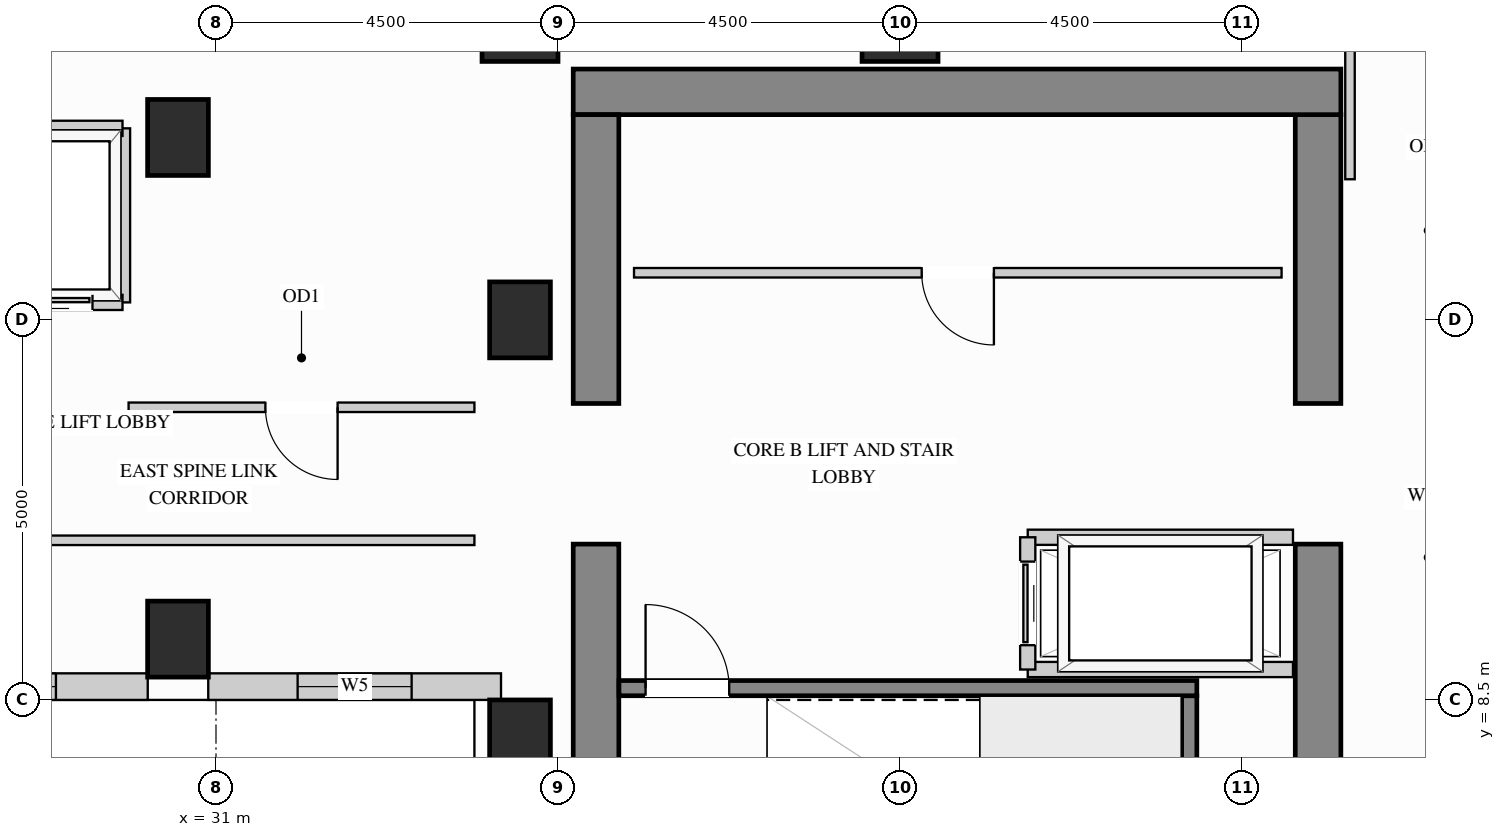
"""IFC4 building model, lengths in metres.
Left out: names, types, materials, properties, quantities, classifications, styles, units other than length and angle.
Written with IfcOpenShell. Run it as: python <this file> out.ifc"""

import sys

from ifc_helpers import new_model, si_unit, direction, frame, frame_2d, origin, origin_2d, place, context, subcontext, project, spatial, rectangle, extrude, source, transform, mapped, element, fill, save


model = new_model("IFC4")
c1 = context("Model", 3, precision=1e-05, world=origin(), true_north=direction((0.0, 1.0)))
c2 = subcontext(c1, "Body", "Model", "MODEL_VIEW")
j1 = project(units=[si_unit("LENGTHUNIT", "METRE"), si_unit("PLANEANGLEUNIT", "RADIAN")], contexts=[c1])
p1 = place(None, origin())
s1 = spatial("IfcSite", under=j1, at=p1, CompositionType="ELEMENT")
p2 = place(p1, origin())
s2 = spatial("IfcBuilding", under=s1, at=p2, CompositionType="ELEMENT")
p3 = place(p2, frame((0.0, 0.0, 179.1)))
s3 = spatial("IfcBuildingStorey", under=s2, at=p3, CompositionType="ELEMENT", Elevation=179.1)
m1 = source(origin(), c2, "Body", "SweptSolid", [
    extrude(rectangle(XDim=0.8, YDim=1.0, at=origin_2d()), origin(), (0.0, 0.0, 1.0), 3.4),
])
for number, where, z_axis, x_axis in (
    (1, (35.0, 13.5, 0.0), (0.0, 0.0, 1.0), (1.0, 0.0, 0.0)),
    (2, (35.0, 8.0, 0.0), (0.0, 0.0, 1.0), (1.0, 0.0, 0.0)),
    (3, (30.5, 15.9, 0.0), (0.0, 0.0, 1.0), (1.0, 0.0, 0.0)),
    (4, (30.5, 9.3, 0.0), (0.0, 0.0, 1.0), (1.0, 0.0, 0.0)),
):
    element("IfcColumn", number, at=place(p3, frame(where, z_axis=z_axis, x_axis=x_axis)), inside=s3, PredefinedType="COLUMN", context=c2, shape_type="MappedRepresentation", body=[
        mapped(m1, transform((0.0, 0.0, 0.0), x_axis=(1.0, 0.0, 0.0), y_axis=(0.0, 1.0, 0.0), z_axis=(0.0, 0.0, 1.0))),
    ])
m2 = source(origin(), c2, "Body", "SweptSolid", [
    extrude(rectangle(XDim=1.0, YDim=1.0, at=origin_2d()), origin(), (0.0, 0.0, 1.0), 3.4),
])
for number, where, z_axis, x_axis in (
    (5, (35.0, 17.4, 0.0), (0.0, 0.0, 1.0), (1.0, 0.0, 0.0)),
    (6, (40.0, 17.4, 0.0), (0.0, 0.0, 1.0), (1.0, 0.0, 0.0)),
):
    element("IfcColumn", number, at=place(p3, frame(where, z_axis=z_axis, x_axis=x_axis)), inside=s3, PredefinedType="COLUMN", context=c2, shape_type="MappedRepresentation", body=[
        mapped(m2, transform((0.0, 0.0, 0.0), x_axis=(1.0, 0.0, 0.0), y_axis=(0.0, 1.0, 0.0), z_axis=(0.0, 0.0, 1.0))),
    ])
m3 = source(origin(), c2, "Body", "SweptSolid", [
    extrude(rectangle(XDim=5.75, YDim=0.6, at=frame_2d((2.875, 0.0))), origin(), (0.0, 0.0, 1.0), 3.4),
])
p4 = place(p3, frame((45.5, 4.8, 0.0), z_axis=(0.0, 0.0, 1.0), x_axis=(0.0, 1.0, 0.0)))
e7 = element("IfcWall", 7, at=p4, inside=s3, PredefinedType="SHEAR", context=c2, shape_type="MappedRepresentation", body=[
    mapped(m3, transform((0.0, 0.0, 0.0), x_axis=(1.0, 0.0, 0.0), y_axis=(0.0, 1.0, 0.0), z_axis=(0.0, 0.0, 1.0))),
])
m4 = source(origin(), c2, "Body", "SweptSolid", [
    extrude(rectangle(XDim=3.8, YDim=0.6, at=frame_2d((1.9, 0.0))), origin(), (0.0, 0.0, 1.0), 3.4),
])
p5 = place(p3, frame((45.5, 12.4, 0.0), z_axis=(0.0, 0.0, 1.0), x_axis=(0.0, 1.0, 0.0)))
e8 = element("IfcWall", 8, at=p5, inside=s3, PredefinedType="SHEAR", context=c2, shape_type="MappedRepresentation", body=[
    mapped(m4, transform((0.0, 0.0, 0.0), x_axis=(1.0, 0.0, 0.0), y_axis=(0.0, 1.0, 0.0), z_axis=(0.0, 0.0, 1.0))),
])
m5 = source(origin(), c2, "Body", "SweptSolid", [
    extrude(rectangle(XDim=10.1, YDim=0.6, at=frame_2d((5.05, 0.0))), origin(), (0.0, 0.0, 1.0), 3.4),
])
p6 = place(p3, frame((35.7, 16.5, 0.0), z_axis=(0.0, 0.0, 1.0), x_axis=(1.0, 0.0, 0.0)))
e9 = element("IfcWall", 9, at=p6, inside=s3, PredefinedType="SHEAR", context=c2, shape_type="MappedRepresentation", body=[
    mapped(m5, transform((0.0, 0.0, 0.0), x_axis=(1.0, 0.0, 0.0), y_axis=(0.0, 1.0, 0.0), z_axis=(0.0, 0.0, 1.0))),
])
p7 = place(p3, frame((36.0, 4.8, 0.0), z_axis=(0.0, 0.0, 1.0), x_axis=(0.0, 1.0, 0.0)))
e10 = element("IfcWall", 10, at=p7, inside=s3, PredefinedType="SHEAR", context=c2, shape_type="MappedRepresentation", body=[
    mapped(m3, transform((0.0, 0.0, 0.0), x_axis=(1.0, 0.0, 0.0), y_axis=(0.0, 1.0, 0.0), z_axis=(0.0, 0.0, 1.0))),
])
p8 = place(p3, frame((36.0, 12.4, 0.0), z_axis=(0.0, 0.0, 1.0), x_axis=(0.0, 1.0, 0.0)))
e11 = element("IfcWall", 11, at=p8, inside=s3, PredefinedType="SHEAR", context=c2, shape_type="MappedRepresentation", body=[
    mapped(m4, transform((0.0, 0.0, 0.0), x_axis=(1.0, 0.0, 0.0), y_axis=(0.0, 1.0, 0.0), z_axis=(0.0, 0.0, 1.0))),
])
p9 = place(p3, frame((23.798, 8.675, 0.0), z_axis=(0.0, 0.0, 1.0), x_axis=(1.0, 0.0, 0.0)))
e12 = element("IfcWall", 12, at=p9, inside=s3, PredefinedType="SOLIDWALL", context=c2, shape_type="SweptSolid", body=[
    extrude(rectangle(XDim=6.304, YDim=0.35, at=frame_2d((3.152, 0.0))), origin(), (0.0, 0.0, 1.0), 3.385),
])
p10 = place(p9, frame((1.208, 0.0, 0.78)))
e13 = element("IfcOpeningElement", 13, at=p10, cuts=e12, PredefinedType="OPENING", context=c2, shape_type="SweptSolid", body=[
    extrude(rectangle(XDim=1.5, YDim=2.0, at=frame_2d((0.75, 1.0))), frame((0.0, 0.185, 0.0), z_axis=(0.0, -1.0, 0.0), x_axis=(1.0, 0.0, 0.0)), (0.0, 0.0, 1.0), 0.37),
])
p11 = place(p9, frame((3.596, 0.0, 0.78)))
e14 = element("IfcOpeningElement", 14, at=p11, cuts=e12, PredefinedType="OPENING", context=c2, shape_type="SweptSolid", body=[
    extrude(rectangle(XDim=1.5, YDim=2.0, at=frame_2d((0.75, 1.0))), frame((0.0, 0.185, 0.0), z_axis=(0.0, -1.0, 0.0), x_axis=(1.0, 0.0, 0.0)), (0.0, 0.0, 1.0), 0.37),
])
p12 = place(p3, frame((30.898, 8.675, 0.0), z_axis=(0.0, 0.0, 1.0), x_axis=(1.0, 0.0, 0.0)))
e15 = element("IfcWall", 15, at=p12, inside=s3, PredefinedType="SOLIDWALL", context=c2, shape_type="SweptSolid", body=[
    extrude(rectangle(XDim=3.852, YDim=0.35, at=frame_2d((1.926, 0.0))), origin(), (0.0, 0.0, 1.0), 3.385),
])
p13 = place(p12, frame((1.176, 0.0, 0.78)))
e16 = element("IfcOpeningElement", 16, at=p13, cuts=e15, PredefinedType="OPENING", context=c2, shape_type="SweptSolid", body=[
    extrude(rectangle(XDim=1.5, YDim=2.0, at=frame_2d((0.75, 1.0))), frame((0.0, 0.185, 0.0), z_axis=(0.0, -1.0, 0.0), x_axis=(1.0, 0.0, 0.0)), (0.0, 0.0, 1.0), 0.37),
])
p14 = place(p3, frame((36.5, 14.12, 0.0), z_axis=(0.0, 0.0, 1.0), x_axis=(1.0, 0.0, 0.0)))
e17 = element("IfcWall", 17, at=p14, inside=s3, PredefinedType="PARTITIONING", context=c2, shape_type="SweptSolid", body=[
    extrude(rectangle(XDim=8.52, YDim=0.125, at=frame_2d((4.26, 0.0))), origin(), (0.0, 0.0, 1.0), 3.385),
])
p15 = place(p14, frame((3.785, 0.0, 0.0)))
e18 = element("IfcOpeningElement", 18, at=p15, cuts=e17, PredefinedType="OPENING", context=c2, shape_type="SweptSolid", body=[
    extrude(rectangle(XDim=0.95, YDim=2.15, at=frame_2d((0.475, 1.075))), frame((0.0, 0.073, 0.0), z_axis=(0.0, -1.0, 0.0), x_axis=(1.0, 0.0, 0.0)), (0.0, 0.0, 1.0), 0.145),
])
m6 = source(origin(), c2, "Body", "SweptSolid", [
    extrude(rectangle(XDim=2.298, YDim=0.125, at=frame_2d((1.149, 0.0))), origin(), (0.0, 0.0, 1.0), 3.385),
])
p16 = place(p3, frame((45.92, 15.35, 0.0), z_axis=(0.0, 0.0, 1.0), x_axis=(0.0, 1.0, 0.0)))
e19 = element("IfcWall", 19, at=p16, inside=s3, PredefinedType="PARTITIONING", context=c2, shape_type="MappedRepresentation", body=[
    mapped(m6, transform((0.0, 0.0, 0.0), x_axis=(1.0, 0.0, 0.0), y_axis=(0.0, 1.0, 0.0), z_axis=(0.0, 0.0, 1.0))),
])
p17 = place(p3, frame((29.85, 12.35, 0.0), z_axis=(0.0, 0.0, 1.0), x_axis=(1.0, 0.0, 0.0)))
e20 = element("IfcWall", 20, at=p17, inside=s3, PredefinedType="PARTITIONING", context=c2, shape_type="SweptSolid", body=[
    extrude(rectangle(XDim=4.55, YDim=0.125, at=frame_2d((2.275, 0.0))), origin(), (0.0, 0.0, 1.0), 3.385),
])
p18 = place(p17, frame((1.8, 0.0, 0.0)))
e21 = element("IfcOpeningElement", 21, at=p18, cuts=e20, PredefinedType="OPENING", context=c2, shape_type="SweptSolid", body=[
    extrude(rectangle(XDim=0.95, YDim=2.15, at=frame_2d((0.475, 1.075))), frame((0.0, 0.073, 0.0), z_axis=(0.0, -1.0, 0.0), x_axis=(1.0, 0.0, 0.0)), (0.0, 0.0, 1.0), 0.145),
])
p19 = place(p3, frame((19.5, 10.6, 0.0), z_axis=(0.0, 0.0, 1.0), x_axis=(1.0, 0.0, 0.0)))
e22 = element("IfcWall", 22, at=p19, inside=s3, PredefinedType="PARTITIONING", context=c2, shape_type="SweptSolid", body=[
    extrude(rectangle(XDim=14.9, YDim=0.125, at=frame_2d((7.45, 0.0))), origin(), (0.0, 0.0, 1.0), 3.385),
])
p20 = place(p19, frame((6.975, 0.0, 0.0)))
e23 = element("IfcOpeningElement", 23, at=p20, cuts=e22, PredefinedType="OPENING", context=c2, shape_type="SweptSolid", body=[
    extrude(rectangle(XDim=0.95, YDim=2.15, at=frame_2d((0.475, 1.075))), frame((0.0, 0.073, 0.0), z_axis=(0.0, -1.0, 0.0), x_axis=(1.0, 0.0, 0.0)), (0.0, 0.0, 1.0), 0.145),
])
m7 = source(origin(), c2, "Body", "SweptSolid", [
    extrude(rectangle(XDim=2.29, YDim=0.2, at=frame_2d((1.145, 0.0))), origin(), (0.0, 0.0, 1.0), 3.385),
])
p21 = place(p3, frame((29.77, 13.73, 0.0), z_axis=(0.0, 0.0, 1.0), x_axis=(0.0, 1.0, 0.0)))
e24 = element("IfcWall", 24, at=p21, inside=s3, PredefinedType="PARTITIONING", context=c2, shape_type="MappedRepresentation", body=[
    mapped(m7, transform((0.0, 0.0, 0.0), x_axis=(1.0, 0.0, 0.0), y_axis=(0.0, 1.0, 0.0), z_axis=(0.0, 0.0, 1.0))),
])
m8 = source(origin(), c2, "Body", "SweptSolid", [
    extrude(rectangle(XDim=1.89, YDim=0.2, at=frame_2d((0.945, 0.0))), origin(), (0.0, 0.0, 1.0), 2.773),
])
p22 = place(p3, frame((27.88, 16.02, 0.0), z_axis=(0.0, 0.0, 1.0), x_axis=(1.0, 0.0, 0.0)))
e25 = element("IfcWall", 25, at=p22, inside=s3, PredefinedType="PARTITIONING", context=c2, shape_type="MappedRepresentation", body=[
    mapped(m8, transform((0.0, 0.0, 0.0), x_axis=(1.0, 0.0, 0.0), y_axis=(0.0, 1.0, 0.0), z_axis=(0.0, 0.0, 1.0))),
])
p23 = place(p3, frame((27.88, 13.73, 0.0), z_axis=(0.0, 0.0, 1.0), x_axis=(1.0, 0.0, 0.0)))
e26 = element("IfcWall", 26, at=p23, inside=s3, PredefinedType="PARTITIONING", context=c2, shape_type="SweptSolid", body=[
    extrude(rectangle(XDim=1.89, YDim=0.2, at=frame_2d((0.945, 0.0))), origin(), (0.0, 0.0, 1.0), 2.466),
])
p24 = place(p23, frame((0.395, 0.0, 0.0)))
e27 = element("IfcOpeningElement", 27, at=p24, cuts=e26, PredefinedType="OPENING", context=c2, shape_type="SweptSolid", body=[
    extrude(rectangle(XDim=1.1, YDim=2.2, at=frame_2d((0.55, 1.1))), frame((0.0, 0.11, 0.0), z_axis=(0.0, -1.0, 0.0), x_axis=(1.0, 0.0, 0.0)), (0.0, 0.0, 1.0), 0.22),
])
m9 = source(origin(), c2, "Body", "SweptSolid", [
    extrude(rectangle(XDim=3.49, YDim=0.2, at=frame_2d((1.745, 0.0))), origin(), (0.0, 0.0, 1.0), 3.385),
])
for number, where, z_axis, x_axis in (
    (28, (41.68, 10.64, 0.0), (0.0, 0.0, 1.0), (1.0, 0.0, 0.0)),
    (29, (41.68, 8.9, 0.0), (0.0, 0.0, 1.0), (1.0, 0.0, 0.0)),
):
    element("IfcWall", number, at=place(p3, frame(where, z_axis=z_axis, x_axis=x_axis)), inside=s3, PredefinedType="PARTITIONING", context=c2, shape_type="MappedRepresentation", body=[
        mapped(m9, transform((0.0, 0.0, 0.0), x_axis=(1.0, 0.0, 0.0), y_axis=(0.0, 1.0, 0.0), z_axis=(0.0, 0.0, 1.0))),
    ])
p25 = place(p3, frame((41.68, 8.9, 0.0), z_axis=(0.0, 0.0, 1.0), x_axis=(0.0, 1.0, 0.0)))
e30 = element("IfcWall", 30, at=p25, inside=s3, PredefinedType="PARTITIONING", context=c2, shape_type="SweptSolid", body=[
    extrude(rectangle(XDim=1.74, YDim=0.2, at=frame_2d((0.87, 0.0))), origin(), (0.0, 0.0, 1.0), 3.385),
])
p26 = place(p25, frame((0.32, 0.0, 0.0)))
e31 = element("IfcOpeningElement", 31, at=p26, cuts=e30, PredefinedType="OPENING", context=c2, shape_type="SweptSolid", body=[
    extrude(rectangle(XDim=1.1, YDim=2.2, at=frame_2d((0.55, 1.1))), frame((0.0, 0.11, 0.0), z_axis=(0.0, -1.0, 0.0), x_axis=(1.0, 0.0, 0.0)), (0.0, 0.0, 1.0), 0.22),
])
m10 = source(origin(), c2, "Body", "SweptSolid", [
    extrude(rectangle(XDim=3.753, YDim=0.2, at=frame_2d((1.876, 0.0))), origin(), (0.0, 0.0, 1.0), 3.4),
])
p27 = place(p3, frame((43.805, 4.802, 0.0), z_axis=(0.0, 0.0, 1.0), x_axis=(0.0, 1.0, 0.0)))
e32 = element("IfcWall", 32, at=p27, inside=s3, PredefinedType="SHEAR", context=c2, shape_type="MappedRepresentation", body=[
    mapped(m10, transform((0.0, 0.0, 0.0), x_axis=(1.0, 0.0, 0.0), y_axis=(0.0, 1.0, 0.0), z_axis=(0.0, 0.0, 1.0))),
])
p28 = place(p3, frame((36.302, 8.655, 0.0), z_axis=(0.0, 0.0, 1.0), x_axis=(1.0, 0.0, 0.0)))
e33 = element("IfcWall", 33, at=p28, inside=s3, PredefinedType="SHEAR", context=c2, shape_type="SweptSolid", body=[
    extrude(rectangle(XDim=7.603, YDim=0.2, at=frame_2d((3.802, 0.0))), origin(), (0.0, 0.0, 1.0), 3.4),
])
p29 = place(p28, frame((0.35, 0.0, 0.0)))
e34 = element("IfcOpeningElement", 34, at=p29, cuts=e33, PredefinedType="OPENING", context=c2, shape_type="SweptSolid", body=[
    extrude(rectangle(XDim=1.1, YDim=2.15, at=frame_2d((0.55, 1.075))), frame((0.0, 0.11, 0.0), z_axis=(0.0, -1.0, 0.0), x_axis=(1.0, 0.0, 0.0)), (0.0, 0.0, 1.0), 0.22),
])
m11 = source(origin(), c2, "Body", "SweptSolid", [
    extrude(rectangle(XDim=1.1, YDim=2.2, at=frame_2d((0.55, 1.1))), frame((0.0, 0.025, 0.0), z_axis=(0.0, -1.0, 0.0), x_axis=(1.0, 0.0, 0.0)), (0.0, 0.0, 1.0), 0.05),
])
p30 = place(p24, origin())
e35 = element("IfcDoor", 35, at=p30, inside=s3, OperationType="SLIDING_TO_LEFT", PredefinedType="DOOR", context=c2, shape_type="MappedRepresentation", body=[
    mapped(m11, transform((0.0, 0.0, 0.0), x_axis=(1.0, 0.0, 0.0), y_axis=(0.0, 1.0, 0.0), z_axis=(0.0, 0.0, 1.0))),
])
fill(e27, e35)
p31 = place(p26, origin())
e36 = element("IfcDoor", 36, at=p31, inside=s3, OperationType="SLIDING_TO_LEFT", PredefinedType="DOOR", context=c2, shape_type="MappedRepresentation", body=[
    mapped(m11, transform((0.0, 0.0, 0.0), x_axis=(1.0, 0.0, 0.0), y_axis=(0.0, 1.0, 0.0), z_axis=(0.0, 0.0, 1.0))),
])
fill(e31, e36)
m12 = source(origin(), c2, "Body", "SweptSolid", [
    extrude(rectangle(XDim=0.95, YDim=2.15, at=frame_2d((0.475, 1.075))), frame((0.0, 0.025, 0.0), z_axis=(0.0, -1.0, 0.0), x_axis=(1.0, 0.0, 0.0)), (0.0, 0.0, 1.0), 0.05),
])
p32 = place(p15, origin())
e37 = element("IfcDoor", 37, at=p32, inside=s3, OperationType="SINGLE_SWING_RIGHT", PredefinedType="DOOR", context=c2, shape_type="MappedRepresentation", body=[
    mapped(m12, transform((0.0, 0.0, 0.0), x_axis=(1.0, 0.0, 0.0), y_axis=(0.0, 1.0, 0.0), z_axis=(0.0, 0.0, 1.0))),
])
fill(e18, e37)
p33 = place(p18, origin())
e38 = element("IfcDoor", 38, at=p33, inside=s3, OperationType="SINGLE_SWING_RIGHT", PredefinedType="DOOR", context=c2, shape_type="MappedRepresentation", body=[
    mapped(m12, transform((0.0, 0.0, 0.0), x_axis=(1.0, 0.0, 0.0), y_axis=(0.0, 1.0, 0.0), z_axis=(0.0, 0.0, 1.0))),
])
fill(e21, e38)
m13 = source(origin(), c2, "Body", "SweptSolid", [
    extrude(rectangle(XDim=1.1, YDim=2.15, at=frame_2d((0.55, 1.075))), frame((0.0, 0.025, 0.0), z_axis=(0.0, -1.0, 0.0), x_axis=(1.0, 0.0, 0.0)), (0.0, 0.0, 1.0), 0.05),
])
p34 = place(p29, origin())
e39 = element("IfcDoor", 39, at=p34, inside=s3, OperationType="SINGLE_SWING_LEFT", PredefinedType="DOOR", context=c2, shape_type="MappedRepresentation", body=[
    mapped(m13, transform((0.0, 0.0, 0.0), x_axis=(1.0, 0.0, 0.0), y_axis=(0.0, 1.0, 0.0), z_axis=(0.0, 0.0, 1.0))),
])
fill(e34, e39)
m14 = source(origin(), c2, "Body", "SweptSolid", [
    extrude(rectangle(XDim=1.5, YDim=2.0, at=frame_2d((0.75, 1.0))), frame((0.0, 0.03, 0.0), z_axis=(0.0, -1.0, 0.0), x_axis=(1.0, 0.0, 0.0)), (0.0, 0.0, 1.0), 0.06),
])
p35 = place(p11, origin())
e40 = element("IfcWindow", 40, at=p35, inside=s3, PartitioningType="SINGLE_PANEL", PredefinedType="WINDOW", context=c2, shape_type="MappedRepresentation", body=[
    mapped(m14, transform((0.0, 0.0, 0.0), x_axis=(1.0, 0.0, 0.0), y_axis=(0.0, 1.0, 0.0), z_axis=(0.0, 0.0, 1.0))),
])
fill(e14, e40)
p36 = place(p13, origin())
e41 = element("IfcWindow", 41, at=p36, inside=s3, PartitioningType="SINGLE_PANEL", PredefinedType="WINDOW", context=c2, shape_type="MappedRepresentation", body=[
    mapped(m14, transform((0.0, 0.0, 0.0), x_axis=(1.0, 0.0, 0.0), y_axis=(0.0, 1.0, 0.0), z_axis=(0.0, 0.0, 1.0))),
])
fill(e16, e41)
save(model, sys.argv[1])
